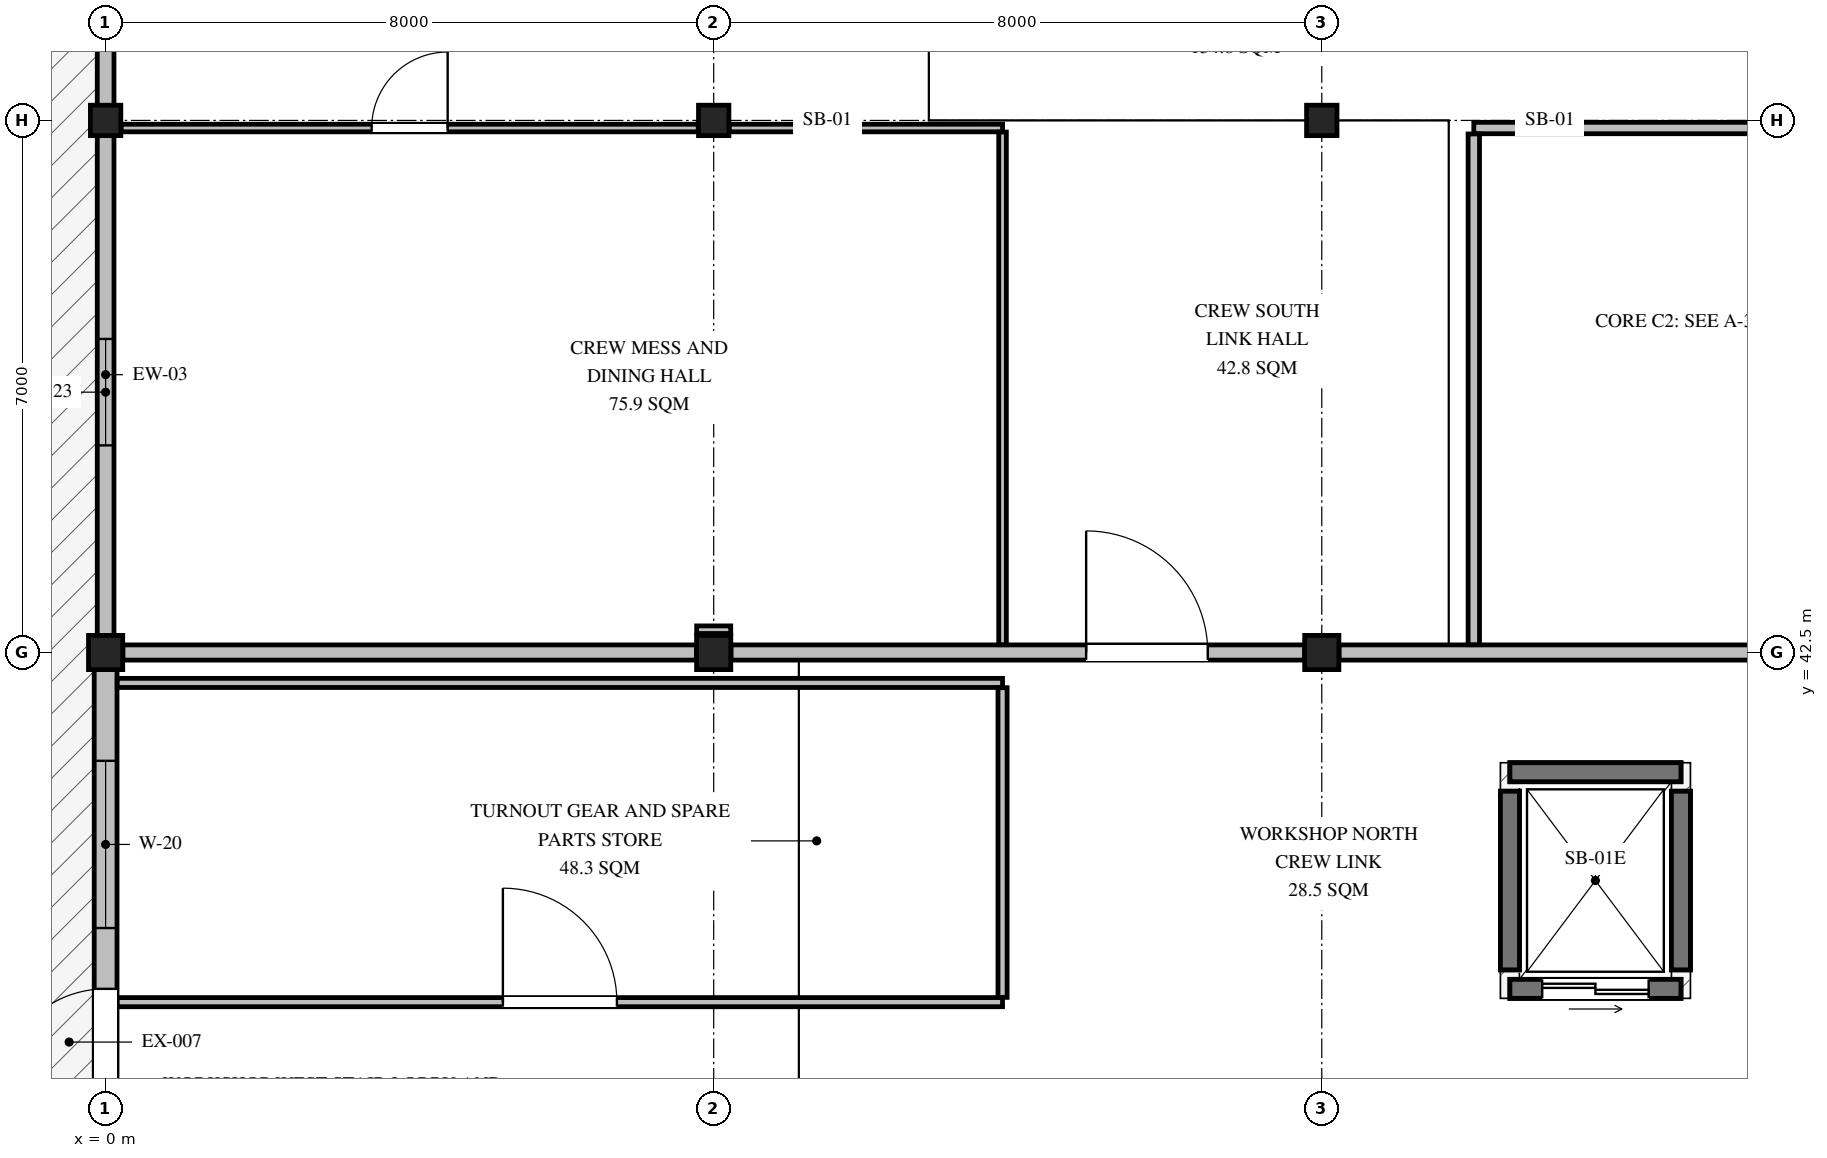
"""IFC4 building model, lengths in metres.
Left out: names, types, materials, properties, quantities, classifications, styles, units other than length and angle.
Written with IfcOpenShell. Run it as: python <this file> out.ifc"""

import sys

from ifc_helpers import new_model, si_unit, direction, frame, frame_2d, origin, origin_2d, place, context, subcontext, project, spatial, rectangle, hollow_rectangle, i_section, extrude, element, fill, save


model = new_model("IFC4")
c1 = context("Model", 3, precision=1e-05, world=origin(), true_north=direction((0.0, 1.0)))
c2 = subcontext(c1, "Body", "Model", "MODEL_VIEW")
j1 = project(units=[si_unit("LENGTHUNIT", "METRE"), si_unit("PLANEANGLEUNIT", "RADIAN")], contexts=[c1])
p1 = place(None, origin())
s1 = spatial("IfcSite", under=j1, at=p1, CompositionType="ELEMENT")
p2 = place(p1, origin())
s2 = spatial("IfcBuilding", under=s1, at=p2, CompositionType="ELEMENT")
p3 = place(p2, frame((0.0, 0.0, 0.45)))
s3 = spatial("IfcBuildingStorey", under=s2, at=p3, CompositionType="ELEMENT", Elevation=0.45)
p4 = place(p3, frame((0.0, 42.5, -0.45), z_axis=(0.0, 0.0, 1.0), x_axis=(1.0, 0.0, 0.0)))
e1 = element("IfcColumn", 1, at=p4, inside=s3, PredefinedType="COLUMN", context=c2, shape_type="SweptSolid", body=[
    extrude(hollow_rectangle(XDim=0.45, YDim=0.45, WallThickness=0.022, at=origin_2d()), origin(), (0.0, 0.0, 1.0), 5.85),
])
p5 = place(p3, frame((0.0, 49.5, -0.45), z_axis=(0.0, 0.0, 1.0), x_axis=(1.0, 0.0, 0.0)))
e2 = element("IfcColumn", 2, at=p5, inside=s3, PredefinedType="COLUMN", context=c2, shape_type="SweptSolid", body=[
    extrude(i_section(OverallWidth=0.4, OverallDepth=0.4, WebThickness=0.013, FlangeThickness=0.021, FilletRadius=0.022, at=origin_2d()), origin(), (0.0, 0.0, 1.0), 5.85),
])
p6 = place(p3, frame((8.0, 42.5, -0.45), z_axis=(0.0, 0.0, 1.0), x_axis=(1.0, 0.0, 0.0)))
e3 = element("IfcColumn", 3, at=p6, inside=s3, PredefinedType="COLUMN", context=c2, shape_type="SweptSolid", body=[
    extrude(hollow_rectangle(XDim=0.45, YDim=0.45, WallThickness=0.022, at=origin_2d()), origin(), (0.0, 0.0, 1.0), 5.85),
])
p7 = place(p3, frame((8.0, 49.5, -0.45), z_axis=(0.0, 0.0, 1.0), x_axis=(1.0, 0.0, 0.0)))
e4 = element("IfcColumn", 4, at=p7, inside=s3, PredefinedType="COLUMN", context=c2, shape_type="SweptSolid", body=[
    extrude(i_section(OverallWidth=0.4, OverallDepth=0.4, WebThickness=0.013, FlangeThickness=0.021, FilletRadius=0.022, at=origin_2d()), origin(), (0.0, 0.0, 1.0), 5.85),
])
p8 = place(p3, frame((16.0, 42.5, -0.45), z_axis=(0.0, 0.0, 1.0), x_axis=(1.0, 0.0, 0.0)))
e5 = element("IfcColumn", 5, at=p8, inside=s3, PredefinedType="COLUMN", context=c2, shape_type="SweptSolid", body=[
    extrude(hollow_rectangle(XDim=0.45, YDim=0.45, WallThickness=0.022, at=origin_2d()), origin(), (0.0, 0.0, 1.0), 5.85),
])
p9 = place(p3, frame((16.0, 49.5, -0.45), z_axis=(0.0, 0.0, 1.0), x_axis=(1.0, 0.0, 0.0)))
e6 = element("IfcColumn", 6, at=p9, inside=s3, PredefinedType="COLUMN", context=c2, shape_type="SweptSolid", body=[
    extrude(i_section(OverallWidth=0.4, OverallDepth=0.4, WebThickness=0.013, FlangeThickness=0.021, FilletRadius=0.022, at=origin_2d()), origin(), (0.0, 0.0, 1.0), 5.85),
])
p10 = place(p3, frame((0.0, 22.675, 0.0), z_axis=(0.0, 0.0, 1.0), x_axis=(0.0, 1.0, 0.0)))
e7 = element("IfcWall", 7, at=p10, inside=s3, PredefinedType="SOLIDWALL", context=c2, shape_type="SweptSolid", body=[
    extrude(rectangle(XDim=19.6, YDim=0.3, at=frame_2d((9.8, 0.0))), origin(), (0.0, 0.0, 1.0), 4.764),
])
p11 = place(p10, frame((14.0, 0.0, 0.0)))
e8 = element("IfcOpeningElement", 8, at=p11, cuts=e7, PredefinedType="OPENING", context=c2, shape_type="SweptSolid", body=[
    extrude(rectangle(XDim=1.4, YDim=2.35, at=frame_2d((0.7, 1.175))), frame((0.0, 0.16, 0.0), z_axis=(0.0, -1.0, 0.0), x_axis=(1.0, 0.0, 0.0)), (0.0, 0.0, 1.0), 0.32),
])
p12 = place(p10, frame((8.5, 0.0, 1.1)))
e9 = element("IfcOpeningElement", 9, at=p12, cuts=e7, PredefinedType="OPENING", context=c2, shape_type="SweptSolid", body=[
    extrude(rectangle(XDim=2.0, YDim=1.5, at=frame_2d((1.0, 0.75))), frame((0.0, 0.16, 0.0), z_axis=(0.0, -1.0, 0.0), x_axis=(1.0, 0.0, 0.0)), (0.0, 0.0, 1.0), 0.32),
])
p13 = place(p10, frame((16.2, 0.0, 1.1)))
e10 = element("IfcOpeningElement", 10, at=p13, cuts=e7, PredefinedType="OPENING", context=c2, shape_type="SweptSolid", body=[
    extrude(rectangle(XDim=2.2, YDim=1.5, at=frame_2d((1.1, 0.75))), frame((0.0, 0.16, 0.0), z_axis=(0.0, -1.0, 0.0), x_axis=(1.0, 0.0, 0.0)), (0.0, 0.0, 1.0), 0.32),
])
p14 = place(p3, frame((0.0, 42.725, 0.0), z_axis=(0.0, 0.0, 1.0), x_axis=(0.0, 1.0, 0.0)))
e11 = element("IfcWall", 11, at=p14, inside=s3, PredefinedType="SOLIDWALL", context=c2, shape_type="SweptSolid", body=[
    extrude(rectangle(XDim=13.55, YDim=0.22, at=frame_2d((6.775, 0.0))), origin(), (0.0, 0.0, 1.0), 4.544),
])
p15 = place(p14, frame((8.05, 0.0, 0.0)))
e12 = element("IfcOpeningElement", 12, at=p15, cuts=e11, PredefinedType="OPENING", context=c2, shape_type="SweptSolid", body=[
    extrude(rectangle(XDim=1.4, YDim=2.35, at=frame_2d((0.7, 1.175))), frame((0.0, 0.12, 0.0), z_axis=(0.0, -1.0, 0.0), x_axis=(1.0, 0.0, 0.0)), (0.0, 0.0, 1.0), 0.24),
])
p16 = place(p14, frame((2.5, 0.0, 1.0)))
e13 = element("IfcOpeningElement", 13, at=p16, cuts=e11, PredefinedType="OPENING", context=c2, shape_type="SweptSolid", body=[
    extrude(rectangle(XDim=1.4, YDim=1.8, at=frame_2d((0.7, 0.9))), frame((0.0, 0.12, 0.0), z_axis=(0.0, -1.0, 0.0), x_axis=(1.0, 0.0, 0.0)), (0.0, 0.0, 1.0), 0.24),
])
for number, where, z_axis, x_axis in (
    (14, (18.475, 38.075, -1.65), (0.0, 0.0, 1.0), (1.0, 0.0, 0.0)),
    (15, (18.475, 40.925, -1.65), (0.0, 0.0, 1.0), (1.0, 0.0, 0.0)),
):
    element("IfcWall", number, at=place(p3, frame(where, z_axis=z_axis, x_axis=x_axis)), inside=s3, PredefinedType="SHEAR", context=c2, shape_type="SweptSolid", body=[
        extrude(rectangle(XDim=2.25, YDim=0.25, at=frame_2d((1.125, 0.0))), origin(), (0.0, 0.0, 1.0), 1.65),
    ])
for number, where, z_axis, x_axis in (
    (16, (18.475, 38.325, -1.65), (0.0, 0.0, 1.0), (0.0, 1.0, 0.0)),
    (17, (20.725, 38.325, -1.65), (0.0, 0.0, 1.0), (0.0, 1.0, 0.0)),
):
    element("IfcWall", number, at=place(p3, frame(where, z_axis=z_axis, x_axis=x_axis)), inside=s3, PredefinedType="SHEAR", context=c2, shape_type="SweptSolid", body=[
        extrude(rectangle(XDim=2.35, YDim=0.25, at=frame_2d((1.175, 0.0))), origin(), (0.0, 0.0, 1.0), 1.65),
    ])
p17 = place(p3, frame((18.475, 38.075, 0.0), z_axis=(0.0, 0.0, 1.0), x_axis=(1.0, 0.0, 0.0)))
e18 = element("IfcWall", 18, at=p17, inside=s3, PredefinedType="SHEAR", context=c2, shape_type="SweptSolid", body=[
    extrude(rectangle(XDim=2.25, YDim=0.25, at=frame_2d((1.125, 0.0))), origin(), (0.0, 0.0, 1.0), 5.16),
])
p18 = place(p17, frame((0.425, 0.0, 0.0)))
e19 = element("IfcOpeningElement", 19, at=p18, cuts=e18, PredefinedType="OPENING", context=c2, shape_type="SweptSolid", body=[
    extrude(rectangle(XDim=1.4, YDim=2.2, at=frame_2d((0.7, 1.1))), frame((0.0, 0.135, 0.0), z_axis=(0.0, -1.0, 0.0), x_axis=(1.0, 0.0, 0.0)), (0.0, 0.0, 1.0), 0.27),
])
p19 = place(p3, frame((18.475, 40.925, 0.0), z_axis=(0.0, 0.0, 1.0), x_axis=(1.0, 0.0, 0.0)))
e20 = element("IfcWall", 20, at=p19, inside=s3, PredefinedType="SHEAR", context=c2, shape_type="SweptSolid", body=[
    extrude(rectangle(XDim=2.25, YDim=0.25, at=frame_2d((1.125, 0.0))), origin(), (0.0, 0.0, 1.0), 5.16),
])
for number, where, z_axis, x_axis in (
    (21, (18.475, 38.325, 0.0), (0.0, 0.0, 1.0), (0.0, 1.0, 0.0)),
    (22, (20.725, 38.325, 0.0), (0.0, 0.0, 1.0), (0.0, 1.0, 0.0)),
):
    element("IfcWall", number, at=place(p3, frame(where, z_axis=z_axis, x_axis=x_axis)), inside=s3, PredefinedType="SHEAR", context=c2, shape_type="SweptSolid", body=[
        extrude(rectangle(XDim=2.35, YDim=0.25, at=frame_2d((1.175, 0.0))), origin(), (0.0, 0.0, 1.0), 5.16),
    ])
p20 = place(p3, frame((0.227, 42.5, 0.0), z_axis=(0.0, 0.0, 1.0), x_axis=(1.0, 0.0, 0.0)))
e23 = element("IfcWall", 23, at=p20, inside=s3, PredefinedType="PARTITIONING", context=c2, shape_type="SweptSolid", body=[
    extrude(rectangle(XDim=7.546, YDim=0.2, at=frame_2d((3.773, 0.0))), origin(), (0.0, 0.0, 1.0), 4.554),
])
p21 = place(p3, frame((8.227, 42.5, 0.0), z_axis=(0.0, 0.0, 1.0), x_axis=(1.0, 0.0, 0.0)))
e24 = element("IfcWall", 24, at=p21, inside=s3, PredefinedType="PARTITIONING", context=c2, shape_type="SweptSolid", body=[
    extrude(rectangle(XDim=7.546, YDim=0.2, at=frame_2d((3.773, 0.0))), origin(), (0.0, 0.0, 1.0), 4.654),
])
p22 = place(p21, frame((4.673, 0.0, 0.0)))
e25 = element("IfcOpeningElement", 25, at=p22, cuts=e24, PredefinedType="OPENING", context=c2, shape_type="SweptSolid", body=[
    extrude(rectangle(XDim=1.6, YDim=2.2, at=frame_2d((0.8, 1.1))), frame((0.0, 0.11, 0.0), z_axis=(0.0, -1.0, 0.0), x_axis=(1.0, 0.0, 0.0)), (0.0, 0.0, 1.0), 0.22),
])
p23 = place(p3, frame((16.227, 42.5, 0.0), z_axis=(0.0, 0.0, 1.0), x_axis=(1.0, 0.0, 0.0)))
e26 = element("IfcWall", 26, at=p23, inside=s3, PredefinedType="PARTITIONING", context=c2, shape_type="SweptSolid", body=[
    extrude(rectangle(XDim=7.546, YDim=0.2, at=frame_2d((3.773, 0.0))), origin(), (0.0, 0.0, 1.0), 4.654),
])
p24 = place(p3, frame((0.153, 37.9, 0.0), z_axis=(0.0, 0.0, 1.0), x_axis=(1.0, 0.0, 0.0)))
e27 = element("IfcWall", 27, at=p24, inside=s3, PredefinedType="PARTITIONING", context=c2, shape_type="SweptSolid", body=[
    extrude(rectangle(XDim=11.647, YDim=0.12, at=frame_2d((5.823, 0.0))), origin(), (0.0, 0.0, 1.0), 5.16),
])
p25 = place(p24, frame((5.073, 0.0, 0.0)))
e28 = element("IfcOpeningElement", 28, at=p25, cuts=e27, PredefinedType="OPENING", context=c2, shape_type="SweptSolid", body=[
    extrude(rectangle(XDim=1.5, YDim=2.25, at=frame_2d((0.75, 1.125))), frame((0.0, 0.07, 0.0), z_axis=(0.0, -1.0, 0.0), x_axis=(1.0, 0.0, 0.0)), (0.0, 0.0, 1.0), 0.14),
])
p26 = place(p3, frame((0.153, 42.1, 0.0), z_axis=(0.0, 0.0, 1.0), x_axis=(1.0, 0.0, 0.0)))
e29 = element("IfcWall", 29, at=p26, inside=s3, PredefinedType="PARTITIONING", context=c2, shape_type="SweptSolid", body=[
    extrude(rectangle(XDim=11.647, YDim=0.12, at=frame_2d((5.823, 0.0))), origin(), (0.0, 0.0, 1.0), 5.16),
])
p27 = place(p3, frame((11.8, 37.963, 0.0), z_axis=(0.0, 0.0, 1.0), x_axis=(0.0, 1.0, 0.0)))
e30 = element("IfcWall", 30, at=p27, inside=s3, PredefinedType="PARTITIONING", context=c2, shape_type="SweptSolid", body=[
    extrude(rectangle(XDim=4.074, YDim=0.12, at=frame_2d((2.037, 0.0))), origin(), (0.0, 0.0, 1.0), 4.754),
])
p28 = place(p3, frame((7.776, 42.8, 0.0), z_axis=(0.0, 0.0, 1.0), x_axis=(1.0, 0.0, 0.0)))
e31 = element("IfcWall", 31, at=p28, inside=s3, PredefinedType="PARTITIONING", context=c2, shape_type="SweptSolid", body=[
    extrude(rectangle(XDim=0.448, YDim=0.1, at=frame_2d((0.224, 0.0))), origin(), (0.0, 0.0, 1.0), 5.2),
])
p29 = place(p3, frame((0.203, 49.4, 0.0), z_axis=(0.0, 0.0, 1.0), x_axis=(1.0, 0.0, 0.0)))
e32 = element("IfcWall", 32, at=p29, inside=s3, PredefinedType="PARTITIONING", context=c2, shape_type="SweptSolid", body=[
    extrude(rectangle(XDim=7.594, YDim=0.1, at=frame_2d((3.797, 0.0))), origin(), (0.0, 0.0, 1.0), 4.294),
])
p30 = place(p29, frame((3.297, 0.0, 0.0)))
e33 = element("IfcOpeningElement", 33, at=p30, cuts=e32, PredefinedType="OPENING", context=c2, shape_type="SweptSolid", body=[
    extrude(rectangle(XDim=1.0, YDim=2.1, at=frame_2d((0.5, 1.05))), frame((0.0, 0.06, 0.0), z_axis=(0.0, -1.0, 0.0), x_axis=(1.0, 0.0, 0.0)), (0.0, 0.0, 1.0), 0.12),
])
p31 = place(p3, frame((8.203, 49.4, 0.0), z_axis=(0.0, 0.0, 1.0), x_axis=(1.0, 0.0, 0.0)))
e34 = element("IfcWall", 34, at=p31, inside=s3, PredefinedType="PARTITIONING", context=c2, shape_type="SweptSolid", body=[
    extrude(rectangle(XDim=3.597, YDim=0.1, at=frame_2d((1.799, 0.0))), origin(), (0.0, 0.0, 1.0), 4.094),
])
p32 = place(p3, frame((11.8, 42.603, 0.0), z_axis=(0.0, 0.0, 1.0), x_axis=(0.0, 1.0, 0.0)))
e35 = element("IfcWall", 35, at=p32, inside=s3, PredefinedType="PARTITIONING", context=c2, shape_type="SweptSolid", body=[
    extrude(rectangle(XDim=6.744, YDim=0.1, at=frame_2d((3.372, 0.0))), origin(), (0.0, 0.0, 1.0), 4.804),
])
p33 = place(p3, frame((18.0, 49.4, 0.0), z_axis=(0.0, 0.0, 1.0), x_axis=(1.0, 0.0, 0.0)))
e36 = element("IfcWall", 36, at=p33, inside=s3, PredefinedType="PARTITIONING", context=c2, shape_type="SweptSolid", body=[
    extrude(rectangle(XDim=5.797, YDim=0.15, at=frame_2d((2.898, 0.0))), origin(), (0.0, 0.0, 1.0), 4.544),
])
p34 = place(p3, frame((18.0, 42.603, 0.0), z_axis=(0.0, 0.0, 1.0), x_axis=(0.0, 1.0, 0.0)))
e37 = element("IfcWall", 37, at=p34, inside=s3, PredefinedType="PARTITIONING", context=c2, shape_type="SweptSolid", body=[
    extrude(rectangle(XDim=6.719, YDim=0.15, at=frame_2d((3.359, 0.0))), origin(), (0.0, 0.0, 1.0), 5.2),
])
p35 = place(p11, origin())
e38 = element("IfcDoor", 38, at=p35, inside=s3, OperationType="SINGLE_SWING_LEFT", PredefinedType="DOOR", context=c2, shape_type="SweptSolid", body=[
    extrude(rectangle(XDim=1.4, YDim=2.35, at=frame_2d((0.7, 1.175))), frame((0.0, 0.025, 0.0), z_axis=(0.0, -1.0, 0.0), x_axis=(1.0, 0.0, 0.0)), (0.0, 0.0, 1.0), 0.05),
])
fill(e8, e38)
p36 = place(p13, origin())
e39 = element("IfcWindow", 39, at=p36, inside=s3, PartitioningType="SINGLE_PANEL", PredefinedType="WINDOW", context=c2, shape_type="SweptSolid", body=[
    extrude(rectangle(XDim=2.2, YDim=1.5, at=frame_2d((1.1, 0.75))), frame((0.0, 0.03, 0.0), z_axis=(0.0, -1.0, 0.0), x_axis=(1.0, 0.0, 0.0)), (0.0, 0.0, 1.0), 0.06),
])
fill(e10, e39)
p37 = place(p16, origin())
e40 = element("IfcWindow", 40, at=p37, inside=s3, PartitioningType="SINGLE_PANEL", PredefinedType="WINDOW", context=c2, shape_type="SweptSolid", body=[
    extrude(rectangle(XDim=1.4, YDim=1.8, at=frame_2d((0.7, 0.9))), frame((0.0, 0.03, 0.0), z_axis=(0.0, -1.0, 0.0), x_axis=(1.0, 0.0, 0.0)), (0.0, 0.0, 1.0), 0.06),
])
fill(e13, e40)
p38 = place(p18, origin())
e41 = element("IfcDoor", 41, at=p38, inside=s3, OperationType="DOUBLE_DOOR_SLIDING", PredefinedType="DOOR", context=c2, shape_type="SweptSolid", body=[
    extrude(rectangle(XDim=1.4, YDim=2.2, at=frame_2d((0.7, 1.1))), frame((0.0, 0.025, 0.0), z_axis=(0.0, -1.0, 0.0), x_axis=(1.0, 0.0, 0.0)), (0.0, 0.0, 1.0), 0.05),
])
fill(e19, e41)
p39 = place(p22, origin())
e42 = element("IfcDoor", 42, at=p39, inside=s3, OperationType="SINGLE_SWING_LEFT", PredefinedType="DOOR", context=c2, shape_type="SweptSolid", body=[
    extrude(rectangle(XDim=1.6, YDim=2.2, at=frame_2d((0.8, 1.1))), frame((0.0, 0.025, 0.0), z_axis=(0.0, -1.0, 0.0), x_axis=(1.0, 0.0, 0.0)), (0.0, 0.0, 1.0), 0.05),
])
fill(e25, e42)
p40 = place(p25, origin())
e43 = element("IfcDoor", 43, at=p40, inside=s3, OperationType="SINGLE_SWING_LEFT", PredefinedType="DOOR", context=c2, shape_type="SweptSolid", body=[
    extrude(rectangle(XDim=1.5, YDim=2.25, at=frame_2d((0.75, 1.125))), frame((0.0, 0.025, 0.0), z_axis=(0.0, -1.0, 0.0), x_axis=(1.0, 0.0, 0.0)), (0.0, 0.0, 1.0), 0.05),
])
fill(e28, e43)
p41 = place(p30, origin())
e44 = element("IfcDoor", 44, at=p41, inside=s3, OperationType="SINGLE_SWING_RIGHT", PredefinedType="DOOR", context=c2, shape_type="SweptSolid", body=[
    extrude(rectangle(XDim=1.0, YDim=2.1, at=frame_2d((0.5, 1.05))), frame((0.0, 0.025, 0.0), z_axis=(0.0, -1.0, 0.0), x_axis=(1.0, 0.0, 0.0)), (0.0, 0.0, 1.0), 0.05),
])
fill(e33, e44)
save(model, sys.argv[1])
